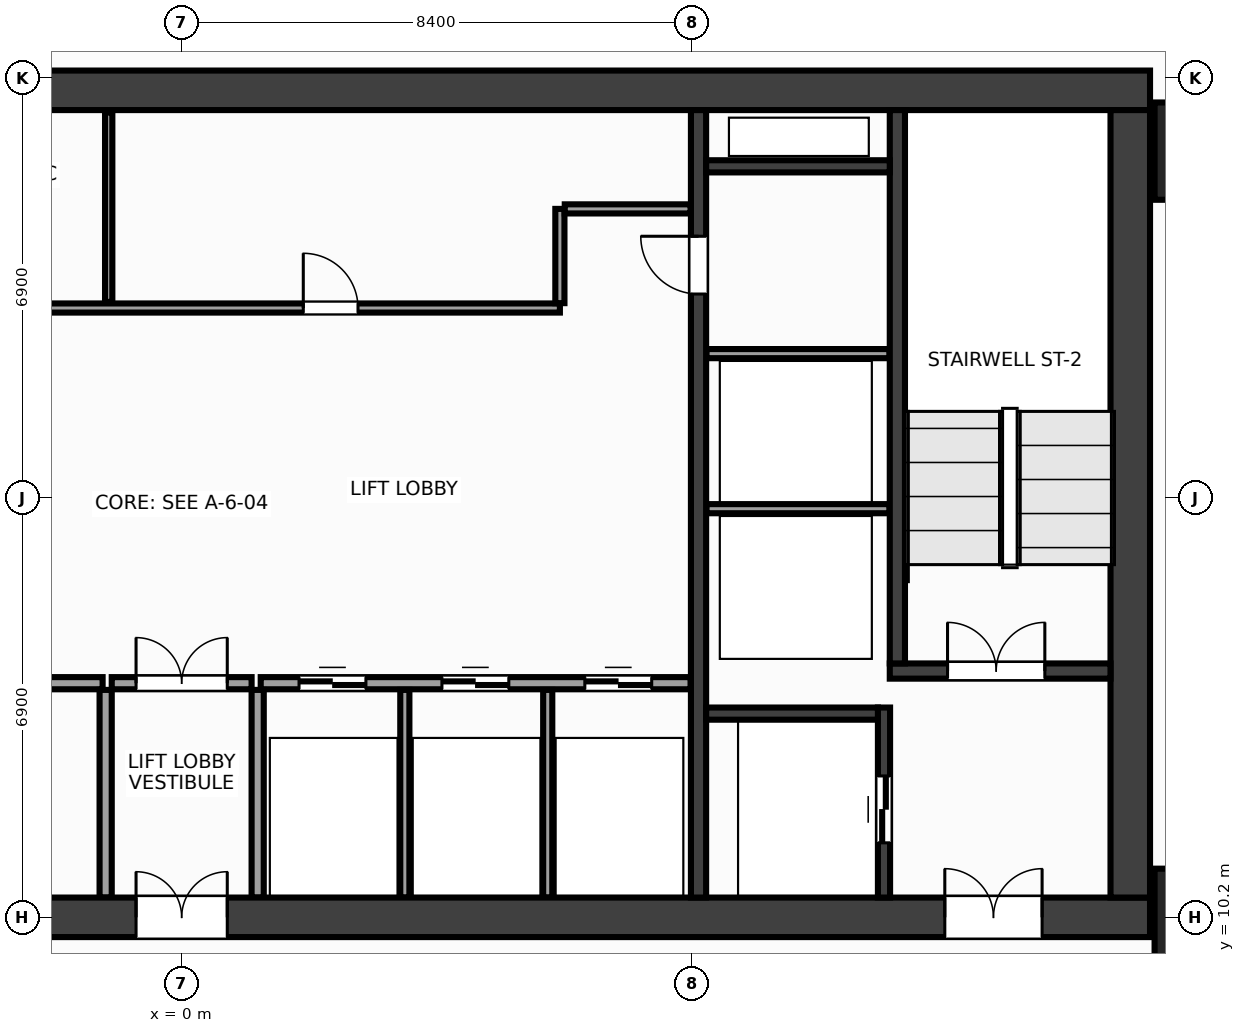
"""IFC4 building model, lengths in metres.
Left out: names, types, materials, properties, quantities, classifications, styles, units other than length and angle.
Written with IfcOpenShell. Run it as: python <this file> out.ifc"""

import sys

from ifc_helpers import new_model, si_unit, direction, frame, frame_2d, origin, origin_2d, place, context, subcontext, project, spatial, rectangle, extrude, source, transform, mapped, element, fill, save


model = new_model("IFC4")
c1 = context("Model", 3, precision=1e-05, world=origin(), true_north=direction((0.0, 1.0)))
c2 = subcontext(c1, "Body", "Model", "MODEL_VIEW")
j1 = project(units=[si_unit("LENGTHUNIT", "METRE"), si_unit("PLANEANGLEUNIT", "RADIAN")], contexts=[c1])
p1 = place(None, origin())
s1 = spatial("IfcSite", under=j1, at=p1, CompositionType="ELEMENT")
p2 = place(p1, origin())
s2 = spatial("IfcBuilding", under=s1, at=p2, CompositionType="ELEMENT")
p3 = place(p2, frame((0.0, 0.0, 102.8)))
s3 = spatial("IfcBuildingStorey", under=s2, at=p3, CompositionType="ELEMENT", Elevation=102.8)
m1 = source(origin(), c2, "Body", "SweptSolid", [
    extrude(rectangle(XDim=31.85, YDim=0.65, at=frame_2d((15.925, 0.0))), origin(), (0.0, 0.0, 1.0), 3.6),
])
p4 = place(p3, frame((-15.925, 23.8, 0.0), z_axis=(0.0, 0.0, 1.0), x_axis=(1.0, 0.0, 0.0)))
e1 = element("IfcWall", 1, at=p4, inside=s3, PredefinedType="SHEAR", context=c2, shape_type="MappedRepresentation", body=[
    mapped(m1, transform((0.0, 0.0, 0.0), x_axis=(1.0, 0.0, 0.0), y_axis=(0.0, 1.0, 0.0), z_axis=(0.0, 0.0, 1.0), scale=1.0)),
])
p5 = place(p3, frame((-15.925, 10.2, 0.0), z_axis=(0.0, 0.0, 1.0), x_axis=(1.0, 0.0, 0.0)))
e2 = element("IfcWall", 2, at=p5, inside=s3, PredefinedType="SHEAR", context=c2, shape_type="MappedRepresentation", body=[
    mapped(m1, transform((0.0, 0.0, 0.0), x_axis=(1.0, 0.0, 0.0), y_axis=(0.0, 1.0, 0.0), z_axis=(0.0, 0.0, 1.0), scale=1.0)),
])
p6 = place(p5, frame((1.775, 0.0, 0.0)))
e3 = element("IfcOpeningElement", 3, at=p6, cuts=e2, PredefinedType="OPENING", context=c2, shape_type="SweptSolid", body=[
    extrude(rectangle(XDim=1.6, YDim=2.15, at=frame_2d((0.8, 1.075))), frame((0.0, 0.337, 0.0), z_axis=(0.0, -1.0, 0.0), x_axis=(1.0, 0.0, 0.0)), (0.0, 0.0, 1.0), 0.674),
])
p7 = place(p5, frame((28.475, 0.0, 0.0)))
e4 = element("IfcOpeningElement", 4, at=p7, cuts=e2, PredefinedType="OPENING", context=c2, shape_type="SweptSolid", body=[
    extrude(rectangle(XDim=1.6, YDim=2.15, at=frame_2d((0.8, 1.075))), frame((0.0, 0.337, 0.0), z_axis=(0.0, -1.0, 0.0), x_axis=(1.0, 0.0, 0.0)), (0.0, 0.0, 1.0), 0.674),
])
p8 = place(p5, frame((15.175, 0.0, 0.0)))
e5 = element("IfcOpeningElement", 5, at=p8, cuts=e2, PredefinedType="OPENING", context=c2, shape_type="SweptSolid", body=[
    extrude(rectangle(XDim=1.5, YDim=2.2, at=frame_2d((0.75, 1.1))), frame((0.0, 0.337, 0.0), z_axis=(0.0, -1.0, 0.0), x_axis=(1.0, 0.0, 0.0)), (0.0, 0.0, 1.0), 0.674),
])
m2 = source(origin(), c2, "Body", "SweptSolid", [
    extrude(rectangle(XDim=12.95, YDim=0.65, at=frame_2d((6.475, 0.0))), origin(), (0.0, 0.0, 1.0), 3.6),
])
p9 = place(p3, frame((15.6, 10.525, 0.0), z_axis=(0.0, 0.0, 1.0), x_axis=(0.0, 1.0, 0.0)))
e6 = element("IfcWall", 6, at=p9, inside=s3, PredefinedType="SHEAR", context=c2, shape_type="MappedRepresentation", body=[
    mapped(m2, transform((0.0, 0.0, 0.0), x_axis=(1.0, 0.0, 0.0), y_axis=(0.0, 1.0, 0.0), z_axis=(0.0, 0.0, 1.0), scale=1.0)),
])
m3 = source(origin(), c2, "Body", "SweptSolid", [
    extrude(rectangle(XDim=12.95, YDim=0.25, at=frame_2d((6.475, 0.0))), origin(), (0.0, 0.0, 1.0), 3.6),
])
p10 = place(p3, frame((8.5, 10.525, 0.0), z_axis=(0.0, 0.0, 1.0), x_axis=(0.0, 1.0, 0.0)))
e7 = element("IfcWall", 7, at=p10, inside=s3, PredefinedType="SHEAR", context=c2, shape_type="MappedRepresentation", body=[
    mapped(m3, transform((0.0, 0.0, 0.0), x_axis=(1.0, 0.0, 0.0), y_axis=(0.0, 1.0, 0.0), z_axis=(0.0, 0.0, 1.0), scale=1.0)),
])
p11 = place(p10, frame((9.925, 0.0, 0.0)))
e8 = element("IfcOpeningElement", 8, at=p11, cuts=e7, PredefinedType="OPENING", context=c2, shape_type="SweptSolid", body=[
    extrude(rectangle(XDim=0.95, YDim=2.15, at=frame_2d((0.475, 1.075))), frame((0.0, 0.137, 0.0), z_axis=(0.0, -1.0, 0.0), x_axis=(1.0, 0.0, 0.0)), (0.0, 0.0, 1.0), 0.274),
])
m4 = source(origin(), c2, "Body", "SweptSolid", [
    extrude(rectangle(XDim=3.63, YDim=0.25, at=frame_2d((1.815, 0.0))), origin(), (0.0, 0.0, 1.0), 3.6),
])
p12 = place(p3, frame((11.645, 14.25, 0.0), z_axis=(0.0, 0.0, 1.0), x_axis=(1.0, 0.0, 0.0)))
e9 = element("IfcWall", 9, at=p12, inside=s3, PredefinedType="SHEAR", context=c2, shape_type="MappedRepresentation", body=[
    mapped(m4, transform((0.0, 0.0, 0.0), x_axis=(1.0, 0.0, 0.0), y_axis=(0.0, 1.0, 0.0), z_axis=(0.0, 0.0, 1.0), scale=1.0)),
])
p13 = place(p12, frame((0.95, 0.0, 0.0)))
e10 = element("IfcOpeningElement", 10, at=p13, cuts=e9, PredefinedType="OPENING", context=c2, shape_type="SweptSolid", body=[
    extrude(rectangle(XDim=1.6, YDim=2.15, at=frame_2d((0.8, 1.075))), frame((0.0, 0.137, 0.0), z_axis=(0.0, -1.0, 0.0), x_axis=(1.0, 0.0, 0.0)), (0.0, 0.0, 1.0), 0.274),
])
m5 = source(origin(), c2, "Body", "SweptSolid", [
    extrude(rectangle(XDim=9.1, YDim=0.25, at=frame_2d((4.55, 0.0))), origin(), (0.0, 0.0, 1.0), 3.6),
])
p14 = place(p3, frame((11.77, 14.375, 0.0), z_axis=(0.0, 0.0, 1.0), x_axis=(0.0, 1.0, 0.0)))
e11 = element("IfcWall", 11, at=p14, inside=s3, PredefinedType="SHEAR", context=c2, shape_type="MappedRepresentation", body=[
    mapped(m5, transform((0.0, 0.0, 0.0), x_axis=(1.0, 0.0, 0.0), y_axis=(0.0, 1.0, 0.0), z_axis=(0.0, 0.0, 1.0), scale=1.0)),
])
m6 = source(origin(), c2, "Body", "SweptSolid", [
    extrude(rectangle(XDim=3.125, YDim=0.2, at=frame_2d((1.562, 0.0))), origin(), (0.0, 0.0, 1.0), 3.6),
])
p15 = place(p3, frame((11.55, 10.525, 0.0), z_axis=(0.0, 0.0, 1.0), x_axis=(0.0, 1.0, 0.0)))
e12 = element("IfcWall", 12, at=p15, inside=s3, PredefinedType="SHEAR", context=c2, shape_type="MappedRepresentation", body=[
    mapped(m6, transform((0.0, 0.0, 0.0), x_axis=(1.0, 0.0, 0.0), y_axis=(0.0, 1.0, 0.0), z_axis=(0.0, 0.0, 1.0), scale=1.0)),
])
p16 = place(p15, frame((0.9, 0.0, 0.0)))
e13 = element("IfcOpeningElement", 13, at=p16, cuts=e12, PredefinedType="OPENING", context=c2, shape_type="SweptSolid", body=[
    extrude(rectangle(XDim=1.1, YDim=2.15, at=frame_2d((0.55, 1.075))), frame((0.0, 0.112, 0.0), z_axis=(0.0, -1.0, 0.0), x_axis=(1.0, 0.0, 0.0)), (0.0, 0.0, 1.0), 0.224),
])
m7 = source(origin(), c2, "Body", "SweptSolid", [
    extrude(rectangle(XDim=2.825, YDim=0.2, at=frame_2d((1.413, 0.0))), origin(), (0.0, 0.0, 1.0), 3.6),
])
p17 = place(p3, frame((8.625, 13.55, 0.0), z_axis=(0.0, 0.0, 1.0), x_axis=(1.0, 0.0, 0.0)))
e14 = element("IfcWall", 14, at=p17, inside=s3, PredefinedType="SHEAR", context=c2, shape_type="MappedRepresentation", body=[
    mapped(m7, transform((0.0, 0.0, 0.0), x_axis=(1.0, 0.0, 0.0), y_axis=(0.0, 1.0, 0.0), z_axis=(0.0, 0.0, 1.0), scale=1.0)),
])
m8 = source(origin(), c2, "Body", "SweptSolid", [
    extrude(rectangle(XDim=3.02, YDim=0.2, at=frame_2d((1.51, 0.0))), origin(), (0.0, 0.0, 1.0), 3.6),
])
p18 = place(p3, frame((8.625, 22.55, 0.0), z_axis=(0.0, 0.0, 1.0), x_axis=(1.0, 0.0, 0.0)))
e15 = element("IfcWall", 15, at=p18, inside=s3, PredefinedType="SHEAR", context=c2, shape_type="MappedRepresentation", body=[
    mapped(m8, transform((0.0, 0.0, 0.0), x_axis=(1.0, 0.0, 0.0), y_axis=(0.0, 1.0, 0.0), z_axis=(0.0, 0.0, 1.0), scale=1.0)),
])
m9 = source(origin(), c2, "Body", "SweptSolid", [
    extrude(rectangle(XDim=1.6, YDim=1.6, at=origin_2d()), origin(), (0.0, 0.0, 1.0), 3.6),
])
for number, where, z_axis, x_axis in (
    (16, (16.8, 10.2, 0.0), (0.0, 0.0, 1.0), (1.0, 0.0, 0.0)),
    (17, (16.8, 22.8, 0.0), (0.0, 0.0, 1.0), (1.0, 0.0, 0.0)),
):
    element("IfcColumn", number, at=place(p3, frame(where, z_axis=z_axis, x_axis=x_axis)), inside=s3, PredefinedType="COLUMN", context=c2, shape_type="MappedRepresentation", body=[
        mapped(m9, transform((0.0, 0.0, 0.0), x_axis=(1.0, 0.0, 0.0), y_axis=(0.0, 1.0, 0.0), z_axis=(0.0, 0.0, 1.0), scale=1.0)),
    ])
m10 = source(origin(), c2, "Body", "SweptSolid", [
    extrude(rectangle(XDim=3.01, YDim=0.15, at=frame_2d((1.505, 0.0))), origin(), (0.0, 0.0, 1.0), 3.36),
])
for number, where, z_axis, x_axis in (
    (18, (8.63, 16.92, 0.0), (0.0, 0.0, 1.0), (1.0, 0.0, 0.0)),
    (19, (8.63, 19.47, 0.0), (0.0, 0.0, 1.0), (1.0, 0.0, 0.0)),
):
    element("IfcWall", number, at=place(p3, frame(where, z_axis=z_axis, x_axis=x_axis)), inside=s3, PredefinedType="PARTITIONING", context=c2, shape_type="MappedRepresentation", body=[
        mapped(m10, transform((0.0, 0.0, 0.0), x_axis=(1.0, 0.0, 0.0), y_axis=(0.0, 1.0, 0.0), z_axis=(0.0, 0.0, 1.0), scale=1.0)),
    ])
m11 = source(origin(), c2, "Body", "SweptSolid", [
    extrude(rectangle(XDim=7.07, YDim=0.2, at=frame_2d((3.535, 0.0))), origin(), (0.0, 0.0, 1.0), 3.36),
])
p19 = place(p3, frame((-8.37, 14.05, 0.0), z_axis=(0.0, 0.0, 1.0), x_axis=(1.0, 0.0, 0.0)))
e20 = element("IfcWall", 20, at=p19, inside=s3, PredefinedType="PARTITIONING", context=c2, shape_type="MappedRepresentation", body=[
    mapped(m11, transform((0.0, 0.0, 0.0), x_axis=(1.0, 0.0, 0.0), y_axis=(0.0, 1.0, 0.0), z_axis=(0.0, 0.0, 1.0), scale=1.0)),
])
p20 = place(p19, frame((2.8, 0.0, 0.0)))
e21 = element("IfcOpeningElement", 21, at=p20, cuts=e20, PredefinedType="OPENING", context=c2, shape_type="SweptSolid", body=[
    extrude(rectangle(XDim=0.98, YDim=2.15, at=frame_2d((0.49, 1.075))), frame((0.0, 0.112, 0.0), z_axis=(0.0, -1.0, 0.0), x_axis=(1.0, 0.0, 0.0)), (0.0, 0.0, 1.0), 0.224),
])
p21 = place(p3, frame((1.3, 14.05, 0.0), z_axis=(0.0, 0.0, 1.0), x_axis=(1.0, 0.0, 0.0)))
e22 = element("IfcWall", 22, at=p21, inside=s3, PredefinedType="PARTITIONING", context=c2, shape_type="MappedRepresentation", body=[
    mapped(m11, transform((0.0, 0.0, 0.0), x_axis=(1.0, 0.0, 0.0), y_axis=(0.0, 1.0, 0.0), z_axis=(0.0, 0.0, 1.0), scale=1.0)),
])
p22 = place(p21, frame((0.63, 0.0, 0.0)))
e23 = element("IfcOpeningElement", 23, at=p22, cuts=e22, PredefinedType="OPENING", context=c2, shape_type="SweptSolid", body=[
    extrude(rectangle(XDim=1.1, YDim=2.15, at=frame_2d((0.55, 1.075))), frame((0.0, 0.112, 0.0), z_axis=(0.0, -1.0, 0.0), x_axis=(1.0, 0.0, 0.0)), (0.0, 0.0, 1.0), 0.224),
])
p23 = place(p21, frame((2.98, 0.0, 0.0)))
e24 = element("IfcOpeningElement", 24, at=p23, cuts=e22, PredefinedType="OPENING", context=c2, shape_type="SweptSolid", body=[
    extrude(rectangle(XDim=1.1, YDim=2.15, at=frame_2d((0.55, 1.075))), frame((0.0, 0.112, 0.0), z_axis=(0.0, -1.0, 0.0), x_axis=(1.0, 0.0, 0.0)), (0.0, 0.0, 1.0), 0.224),
])
p24 = place(p21, frame((5.33, 0.0, 0.0)))
e25 = element("IfcOpeningElement", 25, at=p24, cuts=e22, PredefinedType="OPENING", context=c2, shape_type="SweptSolid", body=[
    extrude(rectangle(XDim=1.1, YDim=2.15, at=frame_2d((0.55, 1.075))), frame((0.0, 0.112, 0.0), z_axis=(0.0, -1.0, 0.0), x_axis=(1.0, 0.0, 0.0)), (0.0, 0.0, 1.0), 0.224),
])
m12 = source(origin(), c2, "Body", "SweptSolid", [
    extrude(rectangle(XDim=3.415, YDim=0.2, at=frame_2d((1.708, 0.0))), origin(), (0.0, 0.0, 1.0), 3.36),
])
for number, where, z_axis, x_axis in (
    (26, (-1.25, 10.525, 0.0), (0.0, 0.0, 1.0), (0.0, 1.0, 0.0)),
    (27, (1.25, 10.525, 0.0), (0.0, 0.0, 1.0), (0.0, 1.0, 0.0)),
):
    element("IfcWall", number, at=place(p3, frame(where, z_axis=z_axis, x_axis=x_axis)), inside=s3, PredefinedType="PARTITIONING", context=c2, shape_type="MappedRepresentation", body=[
        mapped(m12, transform((0.0, 0.0, 0.0), x_axis=(1.0, 0.0, 0.0), y_axis=(0.0, 1.0, 0.0), z_axis=(0.0, 0.0, 1.0), scale=1.0)),
    ])
m13 = source(origin(), c2, "Body", "SweptSolid", [
    extrude(rectangle(XDim=2.3, YDim=0.2, at=frame_2d((1.15, 0.0))), origin(), (0.0, 0.0, 1.0), 3.36),
])
p25 = place(p3, frame((-1.15, 14.05, 0.0), z_axis=(0.0, 0.0, 1.0), x_axis=(1.0, 0.0, 0.0)))
e28 = element("IfcWall", 28, at=p25, inside=s3, PredefinedType="PARTITIONING", context=c2, shape_type="MappedRepresentation", body=[
    mapped(m13, transform((0.0, 0.0, 0.0), x_axis=(1.0, 0.0, 0.0), y_axis=(0.0, 1.0, 0.0), z_axis=(0.0, 0.0, 1.0), scale=1.0)),
])
p26 = place(p25, frame((0.4, 0.0, 0.0)))
e29 = element("IfcOpeningElement", 29, at=p26, cuts=e28, PredefinedType="OPENING", context=c2, shape_type="SweptSolid", body=[
    extrude(rectangle(XDim=1.5, YDim=2.2, at=frame_2d((0.75, 1.1))), frame((0.0, 0.112, 0.0), z_axis=(0.0, -1.0, 0.0), x_axis=(1.0, 0.0, 0.0)), (0.0, 0.0, 1.0), 0.224),
])
m14 = source(origin(), c2, "Body", "SweptSolid", [
    extrude(rectangle(XDim=14.59, YDim=0.15, at=frame_2d((7.295, 0.0))), origin(), (0.0, 0.0, 1.0), 3.36),
])
p27 = place(p3, frame((-8.37, 20.22, 0.0), z_axis=(0.0, 0.0, 1.0), x_axis=(1.0, 0.0, 0.0)))
e30 = element("IfcWall", 30, at=p27, inside=s3, PredefinedType="PARTITIONING", context=c2, shape_type="MappedRepresentation", body=[
    mapped(m14, transform((0.0, 0.0, 0.0), x_axis=(1.0, 0.0, 0.0), y_axis=(0.0, 1.0, 0.0), z_axis=(0.0, 0.0, 1.0), scale=1.0)),
])
p28 = place(p27, frame((1.36, 0.0, 0.0)))
e31 = element("IfcOpeningElement", 31, at=p28, cuts=e30, PredefinedType="OPENING", context=c2, shape_type="SweptSolid", body=[
    extrude(rectangle(XDim=0.9, YDim=2.15, at=frame_2d((0.45, 1.075))), frame((0.0, 0.087, 0.0), z_axis=(0.0, -1.0, 0.0), x_axis=(1.0, 0.0, 0.0)), (0.0, 0.0, 1.0), 0.174),
])
p29 = place(p27, frame((4.92, 0.0, 0.0)))
e32 = element("IfcOpeningElement", 32, at=p29, cuts=e30, PredefinedType="OPENING", context=c2, shape_type="SweptSolid", body=[
    extrude(rectangle(XDim=0.9, YDim=2.15, at=frame_2d((0.45, 1.075))), frame((0.0, 0.087, 0.0), z_axis=(0.0, -1.0, 0.0), x_axis=(1.0, 0.0, 0.0)), (0.0, 0.0, 1.0), 0.174),
])
p30 = place(p27, frame((10.37, 0.0, 0.0)))
e33 = element("IfcOpeningElement", 33, at=p30, cuts=e30, PredefinedType="OPENING", context=c2, shape_type="SweptSolid", body=[
    extrude(rectangle(XDim=0.9, YDim=2.15, at=frame_2d((0.45, 1.075))), frame((0.0, 0.087, 0.0), z_axis=(0.0, -1.0, 0.0), x_axis=(1.0, 0.0, 0.0)), (0.0, 0.0, 1.0), 0.174),
])
m15 = source(origin(), c2, "Body", "SweptSolid", [
    extrude(rectangle(XDim=1.55, YDim=0.15, at=frame_2d((0.775, 0.0))), origin(), (0.0, 0.0, 1.0), 3.36),
])
p31 = place(p3, frame((6.22, 20.3, 0.0), z_axis=(0.0, 0.0, 1.0), x_axis=(0.0, 1.0, 0.0)))
e34 = element("IfcWall", 34, at=p31, inside=s3, PredefinedType="PARTITIONING", context=c2, shape_type="MappedRepresentation", body=[
    mapped(m15, transform((0.0, 0.0, 0.0), x_axis=(1.0, 0.0, 0.0), y_axis=(0.0, 1.0, 0.0), z_axis=(0.0, 0.0, 1.0), scale=1.0)),
])
m16 = source(origin(), c2, "Body", "SweptSolid", [
    extrude(rectangle(XDim=2.07, YDim=0.15, at=frame_2d((1.035, 0.0))), origin(), (0.0, 0.0, 1.0), 3.36),
])
p32 = place(p3, frame((6.3, 21.85, 0.0), z_axis=(0.0, 0.0, 1.0), x_axis=(1.0, 0.0, 0.0)))
e35 = element("IfcWall", 35, at=p32, inside=s3, PredefinedType="PARTITIONING", context=c2, shape_type="MappedRepresentation", body=[
    mapped(m16, transform((0.0, 0.0, 0.0), x_axis=(1.0, 0.0, 0.0), y_axis=(0.0, 1.0, 0.0), z_axis=(0.0, 0.0, 1.0), scale=1.0)),
])
m17 = source(origin(), c2, "Body", "SweptSolid", [
    extrude(rectangle(XDim=3.415, YDim=0.15, at=frame_2d((1.708, 0.0))), origin(), (0.0, 0.0, 1.0), 3.36),
])
for number, where, z_axis, x_axis in (
    (36, (3.67, 10.525, 0.0), (0.0, 0.0, 1.0), (0.0, 1.0, 0.0)),
    (37, (6.02, 10.525, 0.0), (0.0, 0.0, 1.0), (0.0, 1.0, 0.0)),
):
    element("IfcWall", number, at=place(p3, frame(where, z_axis=z_axis, x_axis=x_axis)), inside=s3, PredefinedType="PARTITIONING", context=c2, shape_type="MappedRepresentation", body=[
        mapped(m17, transform((0.0, 0.0, 0.0), x_axis=(1.0, 0.0, 0.0), y_axis=(0.0, 1.0, 0.0), z_axis=(0.0, 0.0, 1.0), scale=1.0)),
    ])
m18 = source(origin(), c2, "Body", "SweptSolid", [
    extrude(rectangle(XDim=3.115, YDim=0.12, at=frame_2d((1.558, 0.0))), origin(), (0.0, 0.0, 1.0), 3.36),
])
p33 = place(p3, frame((-1.2, 20.32, 0.0), z_axis=(0.0, 0.0, 1.0), x_axis=(0.0, 1.0, 0.0)))
e38 = element("IfcWall", 38, at=p33, inside=s3, PredefinedType="PARTITIONING", context=c2, shape_type="MappedRepresentation", body=[
    mapped(m18, transform((0.0, 0.0, 0.0), x_axis=(1.0, 0.0, 0.0), y_axis=(0.0, 1.0, 0.0), z_axis=(0.0, 0.0, 1.0), scale=1.0)),
])
m19 = source(origin(), c2, "Body", "SweptSolid", [
    extrude(rectangle(XDim=1.6, YDim=2.15, at=frame_2d((0.8, 1.075))), frame((0.0, 0.025, 0.0), z_axis=(0.0, -1.0, 0.0), x_axis=(1.0, 0.0, 0.0)), (0.0, 0.0, 1.0), 0.05),
])
p34 = place(p13, origin())
e39 = element("IfcDoor", 39, at=p34, inside=s3, OperationType="DOUBLE_DOOR_SINGLE_SWING", PredefinedType="DOOR", context=c2, shape_type="MappedRepresentation", body=[
    mapped(m19, transform((0.0, 0.0, 0.0), x_axis=(1.0, 0.0, 0.0), y_axis=(0.0, 1.0, 0.0), z_axis=(0.0, 0.0, 1.0), scale=1.0)),
])
fill(e10, e39)
p35 = place(p7, origin())
e40 = element("IfcDoor", 40, at=p35, inside=s3, OperationType="DOUBLE_DOOR_SINGLE_SWING", PredefinedType="DOOR", context=c2, shape_type="MappedRepresentation", body=[
    mapped(m19, transform((0.0, 0.0, 0.0), x_axis=(1.0, 0.0, 0.0), y_axis=(0.0, 1.0, 0.0), z_axis=(0.0, 0.0, 1.0), scale=1.0)),
])
fill(e4, e40)
m20 = source(origin(), c2, "Body", "SweptSolid", [
    extrude(rectangle(XDim=1.1, YDim=2.15, at=frame_2d((0.55, 1.075))), frame((0.0, 0.025, 0.0), z_axis=(0.0, -1.0, 0.0), x_axis=(1.0, 0.0, 0.0)), (0.0, 0.0, 1.0), 0.05),
])
p36 = place(p16, origin())
e41 = element("IfcDoor", 41, at=p36, inside=s3, OperationType="DOUBLE_DOOR_SLIDING", PredefinedType="DOOR", context=c2, shape_type="MappedRepresentation", body=[
    mapped(m20, transform((0.0, 0.0, 0.0), x_axis=(1.0, 0.0, 0.0), y_axis=(0.0, 1.0, 0.0), z_axis=(0.0, 0.0, 1.0), scale=1.0)),
])
fill(e13, e41)
m21 = source(origin(), c2, "Body", "SweptSolid", [
    extrude(rectangle(XDim=0.95, YDim=2.15, at=frame_2d((0.475, 1.075))), frame((0.0, 0.025, 0.0), z_axis=(0.0, -1.0, 0.0), x_axis=(1.0, 0.0, 0.0)), (0.0, 0.0, 1.0), 0.05),
])
p37 = place(p11, origin())
e42 = element("IfcDoor", 42, at=p37, inside=s3, OperationType="SINGLE_SWING_RIGHT", PredefinedType="DOOR", context=c2, shape_type="MappedRepresentation", body=[
    mapped(m21, transform((0.0, 0.0, 0.0), x_axis=(1.0, 0.0, 0.0), y_axis=(0.0, 1.0, 0.0), z_axis=(0.0, 0.0, 1.0), scale=1.0)),
])
fill(e8, e42)
p38 = place(p22, origin())
e43 = element("IfcDoor", 43, at=p38, inside=s3, OperationType="DOUBLE_DOOR_SLIDING", PredefinedType="DOOR", context=c2, shape_type="MappedRepresentation", body=[
    mapped(m20, transform((0.0, 0.0, 0.0), x_axis=(1.0, 0.0, 0.0), y_axis=(0.0, 1.0, 0.0), z_axis=(0.0, 0.0, 1.0), scale=1.0)),
])
fill(e23, e43)
p39 = place(p23, origin())
e44 = element("IfcDoor", 44, at=p39, inside=s3, OperationType="DOUBLE_DOOR_SLIDING", PredefinedType="DOOR", context=c2, shape_type="MappedRepresentation", body=[
    mapped(m20, transform((0.0, 0.0, 0.0), x_axis=(1.0, 0.0, 0.0), y_axis=(0.0, 1.0, 0.0), z_axis=(0.0, 0.0, 1.0), scale=1.0)),
])
fill(e24, e44)
p40 = place(p24, origin())
e45 = element("IfcDoor", 45, at=p40, inside=s3, OperationType="DOUBLE_DOOR_SLIDING", PredefinedType="DOOR", context=c2, shape_type="MappedRepresentation", body=[
    mapped(m20, transform((0.0, 0.0, 0.0), x_axis=(1.0, 0.0, 0.0), y_axis=(0.0, 1.0, 0.0), z_axis=(0.0, 0.0, 1.0), scale=1.0)),
])
fill(e25, e45)
m22 = source(origin(), c2, "Body", "SweptSolid", [
    extrude(rectangle(XDim=1.5, YDim=2.2, at=frame_2d((0.75, 1.1))), frame((0.0, 0.025, 0.0), z_axis=(0.0, -1.0, 0.0), x_axis=(1.0, 0.0, 0.0)), (0.0, 0.0, 1.0), 0.05),
])
p41 = place(p26, origin())
e46 = element("IfcDoor", 46, at=p41, inside=s3, OperationType="DOUBLE_DOOR_SINGLE_SWING", PredefinedType="DOOR", context=c2, shape_type="MappedRepresentation", body=[
    mapped(m22, transform((0.0, 0.0, 0.0), x_axis=(1.0, 0.0, 0.0), y_axis=(0.0, 1.0, 0.0), z_axis=(0.0, 0.0, 1.0), scale=1.0)),
])
fill(e29, e46)
p42 = place(p8, origin())
e47 = element("IfcDoor", 47, at=p42, inside=s3, OperationType="DOUBLE_DOOR_SINGLE_SWING", PredefinedType="DOOR", context=c2, shape_type="MappedRepresentation", body=[
    mapped(m22, transform((0.0, 0.0, 0.0), x_axis=(1.0, 0.0, 0.0), y_axis=(0.0, 1.0, 0.0), z_axis=(0.0, 0.0, 1.0), scale=1.0)),
])
fill(e5, e47)
m23 = source(origin(), c2, "Body", "SweptSolid", [
    extrude(rectangle(XDim=0.9, YDim=2.15, at=frame_2d((0.45, 1.075))), frame((0.0, 0.025, 0.0), z_axis=(0.0, -1.0, 0.0), x_axis=(1.0, 0.0, 0.0)), (0.0, 0.0, 1.0), 0.05),
])
p43 = place(p30, origin())
e48 = element("IfcDoor", 48, at=p43, inside=s3, OperationType="SINGLE_SWING_LEFT", PredefinedType="DOOR", context=c2, shape_type="MappedRepresentation", body=[
    mapped(m23, transform((0.0, 0.0, 0.0), x_axis=(1.0, 0.0, 0.0), y_axis=(0.0, 1.0, 0.0), z_axis=(0.0, 0.0, 1.0), scale=1.0)),
])
fill(e33, e48)
save(model, sys.argv[1])
